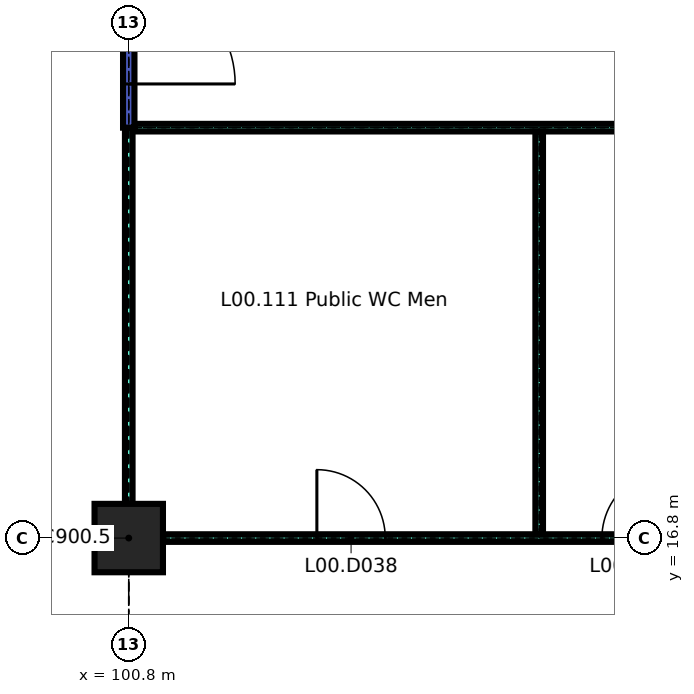
"""IFC4 building model, lengths in metres.
Left out: names, types, materials, properties, quantities, classifications, styles, units other than length and angle.
Written with IfcOpenShell. Run it as: python <this file> out.ifc"""

import sys

from ifc_helpers import new_model, si_unit, direction, frame, frame_2d, origin, origin_2d, place, context, subcontext, project, spatial, rectangle, extrude, element, fill, save


model = new_model("IFC4")
c1 = context("Model", 3, precision=1e-05, world=origin(), true_north=direction((0.0, 1.0)))
c2 = subcontext(c1, "Body", "Model", "MODEL_VIEW")
j1 = project(units=[si_unit("LENGTHUNIT", "METRE"), si_unit("PLANEANGLEUNIT", "RADIAN")], contexts=[c1])
p1 = place(None, origin())
s1 = spatial("IfcSite", under=j1, at=p1, CompositionType="ELEMENT")
p2 = place(p1, origin())
s2 = spatial("IfcBuilding", under=s1, at=p2, CompositionType="ELEMENT")
p3 = place(p2, origin())
s3 = spatial("IfcBuildingStorey", under=s2, at=p3, CompositionType="ELEMENT", Elevation=0.0)
p4 = place(p3, frame((100.8, 16.8, 0.0), z_axis=(0.0, 0.0, 1.0), x_axis=(1.0, 0.0, 0.0)))
e1 = element("IfcColumn", 1, at=p4, inside=s3, PredefinedType="COLUMN", context=c2, shape_type="SweptSolid", body=[
    extrude(rectangle(XDim=0.9, YDim=0.9, at=origin_2d()), origin(), (0.0, 0.0, 1.0), 4.14),
])
p5 = place(p3, frame((101.25, 16.8, 0.0), z_axis=(0.0, 0.0, 1.0), x_axis=(1.0, 0.0, 0.0)))
e2 = element("IfcWall", 2, at=p5, inside=s3, PredefinedType="PARTITIONING", context=c2, shape_type="SweptSolid", body=[
    extrude(rectangle(XDim=7.5, YDim=0.1, at=frame_2d((3.75, 0.0))), origin(), (0.0, 0.0, 1.0), 4.14),
])
p6 = place(p5, frame((2.025, 0.0, 0.0)))
e3 = element("IfcOpeningElement", 3, at=p6, cuts=e2, PredefinedType="OPENING", context=c2, shape_type="SweptSolid", body=[
    extrude(rectangle(XDim=0.9, YDim=2.1, at=frame_2d((0.45, 1.05))), frame((0.0, 0.06, 0.0), z_axis=(0.0, -1.0, 0.0), x_axis=(1.0, 0.0, 0.0)), (0.0, 0.0, 1.0), 0.12),
])
p7 = place(p5, frame((5.775, 0.0, 0.0)))
e4 = element("IfcOpeningElement", 4, at=p7, cuts=e2, PredefinedType="OPENING", context=c2, shape_type="SweptSolid", body=[
    extrude(rectangle(XDim=0.9, YDim=2.1, at=frame_2d((0.45, 1.05))), frame((0.0, 0.06, 0.0), z_axis=(0.0, -1.0, 0.0), x_axis=(1.0, 0.0, 0.0)), (0.0, 0.0, 1.0), 0.12),
])
p8 = place(p3, frame((100.875, 22.2, 0.0), z_axis=(0.0, 0.0, 1.0), x_axis=(1.0, 0.0, 0.0)))
e5 = element("IfcWall", 5, at=p8, inside=s3, PredefinedType="PARTITIONING", context=c2, shape_type="SweptSolid", body=[
    extrude(rectangle(XDim=16.525, YDim=0.1, at=frame_2d((8.262, 0.0))), origin(), (0.0, 0.0, 1.0), 4.14),
])
p9 = place(p3, frame((100.8, 17.25, 0.0), z_axis=(0.0, 0.0, 1.0), x_axis=(0.0, 1.0, 0.0)))
e6 = element("IfcWall", 6, at=p9, inside=s3, PredefinedType="PARTITIONING", context=c2, shape_type="SweptSolid", body=[
    extrude(rectangle(XDim=4.95, YDim=0.1, at=frame_2d((2.475, 0.0))), origin(), (0.0, 0.0, 1.0), 4.14),
])
p10 = place(p3, frame((100.8, 22.2, 0.0), z_axis=(0.0, 0.0, 1.0), x_axis=(0.0, 1.0, 0.0)))
e7 = element("IfcWall", 7, at=p10, inside=s3, PredefinedType="PARTITIONING", context=c2, shape_type="SweptSolid", body=[
    extrude(rectangle(XDim=2.55, YDim=0.15, at=frame_2d((1.275, 0.0))), origin(), (0.0, 0.0, 1.0), 4.14),
])
p11 = place(p10, frame((0.575, 0.0, 0.0)))
e8 = element("IfcOpeningElement", 8, at=p11, cuts=e7, PredefinedType="OPENING", context=c2, shape_type="SweptSolid", body=[
    extrude(rectangle(XDim=1.4, YDim=2.1, at=frame_2d((0.7, 1.05))), frame((0.0, 0.085, 0.0), z_axis=(0.0, -1.0, 0.0), x_axis=(1.0, 0.0, 0.0)), (0.0, 0.0, 1.0), 0.17),
])
p12 = place(p3, frame((106.2, 16.85, 0.0), z_axis=(0.0, 0.0, 1.0), x_axis=(0.0, 1.0, 0.0)))
e9 = element("IfcWall", 9, at=p12, inside=s3, PredefinedType="PARTITIONING", context=c2, shape_type="SweptSolid", body=[
    extrude(rectangle(XDim=5.3, YDim=0.1, at=frame_2d((2.65, 0.0))), origin(), (0.0, 0.0, 1.0), 4.14),
])
p13 = place(p6, origin())
e10 = element("IfcDoor", 10, at=p13, inside=s3, OperationType="SINGLE_SWING_RIGHT", PredefinedType="DOOR", context=c2, shape_type="SweptSolid", body=[
    extrude(rectangle(XDim=0.9, YDim=2.1, at=frame_2d((0.45, 1.05))), frame((0.0, 0.02, 0.0), z_axis=(0.0, -1.0, 0.0), x_axis=(1.0, 0.0, 0.0)), (0.0, 0.0, 1.0), 0.04),
])
fill(e3, e10)
p14 = place(p7, origin())
e11 = element("IfcDoor", 11, at=p14, inside=s3, OperationType="SINGLE_SWING_LEFT", PredefinedType="DOOR", context=c2, shape_type="SweptSolid", body=[
    extrude(rectangle(XDim=0.9, YDim=2.1, at=frame_2d((0.45, 1.05))), frame((0.0, 0.02, 0.0), z_axis=(0.0, -1.0, 0.0), x_axis=(1.0, 0.0, 0.0)), (0.0, 0.0, 1.0), 0.04),
])
fill(e4, e11)
p15 = place(p11, origin())
e12 = element("IfcDoor", 12, at=p15, inside=s3, OperationType="SINGLE_SWING_LEFT", PredefinedType="DOOR", context=c2, shape_type="SweptSolid", body=[
    extrude(rectangle(XDim=1.4, YDim=2.1, at=frame_2d((0.7, 1.05))), frame((0.0, 0.025, 0.0), z_axis=(0.0, -1.0, 0.0), x_axis=(1.0, 0.0, 0.0)), (0.0, 0.0, 1.0), 0.05),
])
fill(e8, e12)
save(model, sys.argv[1])
